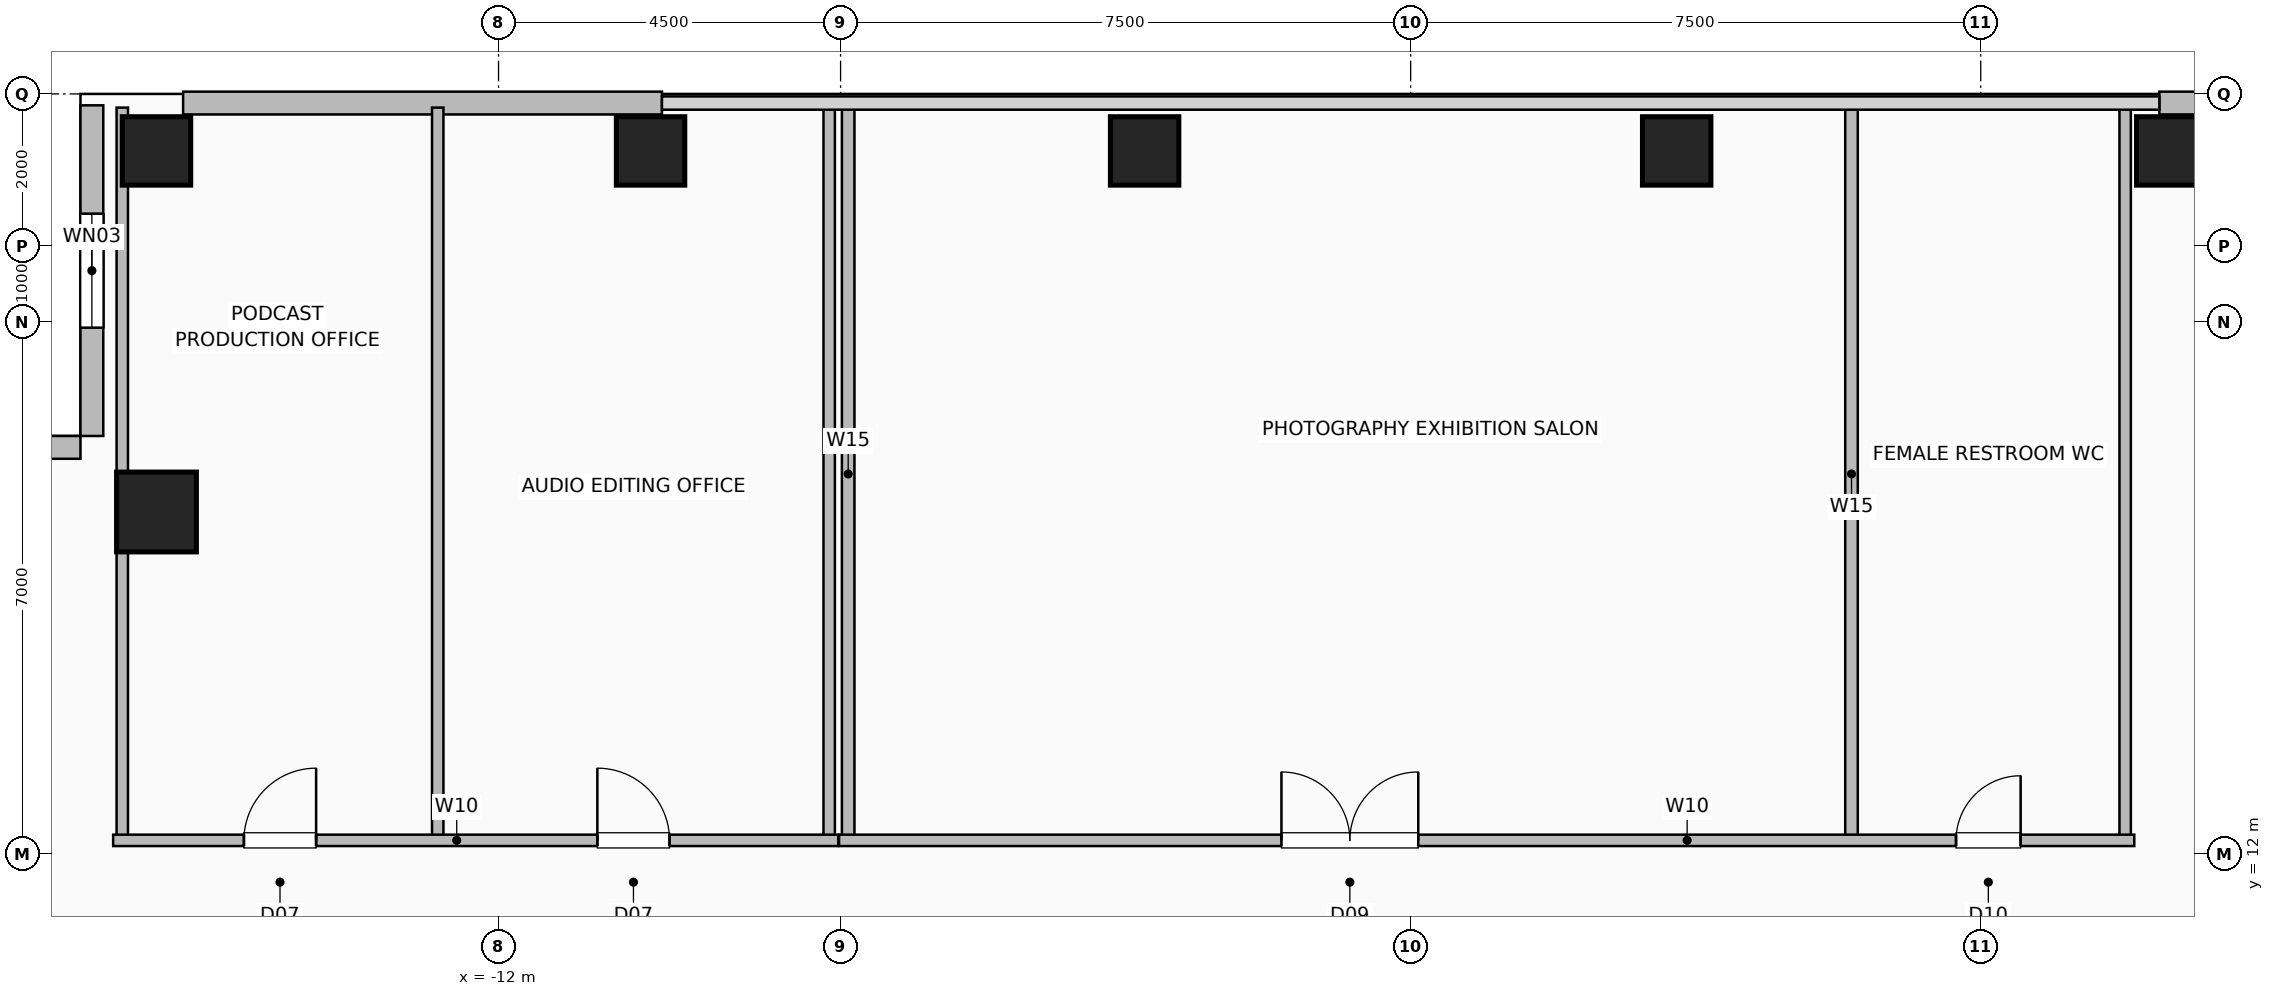
"""IFC4 building model, lengths in metres.
Left out: names, types, materials, properties, quantities, classifications, styles, units other than length and angle.
Written with IfcOpenShell. Run it as: python <this file> out.ifc"""

import sys

from ifc_helpers import new_model, si_unit, direction, frame, frame_2d, origin, origin_2d, place, context, subcontext, project, spatial, rectangle, hollow_rectangle, extrude, element, fill, save


model = new_model("IFC4")
c1 = context("Model", 3, precision=1e-05, world=origin(), true_north=direction((0.0, 1.0)))
c2 = subcontext(c1, "Body", "Model", "MODEL_VIEW")
j1 = project(units=[si_unit("LENGTHUNIT", "METRE"), si_unit("PLANEANGLEUNIT", "RADIAN")], contexts=[c1])
p1 = place(None, origin())
s1 = spatial("IfcSite", under=j1, at=p1, CompositionType="ELEMENT")
p2 = place(p1, origin())
s2 = spatial("IfcBuilding", under=s1, at=p2, CompositionType="ELEMENT")
p3 = place(p2, frame((0.0, 0.0, 144.4)))
s3 = spatial("IfcBuildingStorey", under=s2, at=p3, CompositionType="ELEMENT", Elevation=144.4)
for number, where, z_axis, x_axis in (
    (1, (-16.5, 21.25, 0.0), (0.0, 0.0, 1.0), (1.0, 0.0, 0.0)),
    (2, (-10.0, 21.25, 0.0), (0.0, 0.0, 1.0), (1.0, 0.0, 0.0)),
    (3, (-3.5, 21.25, 0.0), (0.0, 0.0, 1.0), (1.0, 0.0, 0.0)),
    (4, (3.5, 21.25, 0.0), (0.0, 0.0, 1.0), (1.0, 0.0, 0.0)),
    (5, (10.0, 21.25, 0.0), (0.0, 0.0, 1.0), (1.0, 0.0, 0.0)),
):
    element("IfcColumn", number, at=place(p3, frame(where, z_axis=z_axis, x_axis=x_axis)), inside=s3, PredefinedType="COLUMN", context=c2, shape_type="SweptSolid", body=[
        extrude(hollow_rectangle(XDim=0.9, YDim=0.9, WallThickness=0.045, at=origin_2d()), origin(), (0.0, 0.0, 1.0), 3.6),
    ])
p4 = place(p3, frame((-16.5, 16.5, 0.0), z_axis=(0.0, 0.0, 1.0), x_axis=(1.0, 0.0, 0.0)))
e6 = element("IfcColumn", 6, at=p4, inside=s3, PredefinedType="COLUMN", context=c2, shape_type="SweptSolid", body=[
    extrude(hollow_rectangle(XDim=1.05, YDim=1.05, WallThickness=0.05, at=origin_2d()), origin(), (0.0, 0.0, 1.0), 3.6),
])
for number, where, z_axis, x_axis in (
    (7, (-16.15, 21.88, 0.0), (0.0, 0.0, 1.0), (1.0, 0.0, 0.0)),
    (8, (9.85, 21.88, 0.0), (0.0, 0.0, 1.0), (1.0, 0.0, 0.0)),
):
    element("IfcWall", number, at=place(p3, frame(where, z_axis=z_axis, x_axis=x_axis)), inside=s3, PredefinedType="SOLIDWALL", context=c2, shape_type="SweptSolid", body=[
        extrude(rectangle(XDim=6.3, YDim=0.3, at=frame_2d((3.15, 0.0))), origin(), (0.0, 0.0, 1.0), 3.36),
    ])
p5 = place(p3, frame((-17.35, 21.85, 0.0), z_axis=(0.0, 0.0, 1.0), x_axis=(0.0, -1.0, 0.0)))
e9 = element("IfcWall", 9, at=p5, inside=s3, PredefinedType="SOLIDWALL", context=c2, shape_type="SweptSolid", body=[
    extrude(rectangle(XDim=4.35, YDim=0.3, at=frame_2d((2.175, 0.0))), origin(), (0.0, 0.0, 1.0), 3.36),
])
p6 = place(p5, frame((1.425, 0.0, 0.9)))
e10 = element("IfcOpeningElement", 10, at=p6, cuts=e9, PredefinedType="OPENING", context=c2, shape_type="SweptSolid", body=[
    extrude(rectangle(XDim=1.5, YDim=1.8, at=frame_2d((0.75, 0.9))), frame((0.0, 0.16, 0.0), z_axis=(0.0, -1.0, 0.0), x_axis=(1.0, 0.0, 0.0)), (0.0, 0.0, 1.0), 0.32),
])
p7 = place(p3, frame((-21.85, 17.35, 0.0), z_axis=(0.0, 0.0, 1.0), x_axis=(1.0, 0.0, 0.0)))
e11 = element("IfcWall", 11, at=p7, inside=s3, PredefinedType="SOLIDWALL", context=c2, shape_type="SweptSolid", body=[
    extrude(rectangle(XDim=4.35, YDim=0.3, at=frame_2d((2.175, 0.0))), origin(), (0.0, 0.0, 1.0), 3.36),
])
for number, where, z_axis, x_axis in (
    (12, (-16.95, 12.18, 0.0), (0.0, 0.0, 1.0), (0.0, 1.0, 0.0)),
    (13, (-12.8, 12.18, 0.0), (0.0, 0.0, 1.0), (0.0, 1.0, 0.0)),
    (14, (-7.65, 12.18, 0.0), (0.0, 0.0, 1.0), (0.0, 1.0, 0.0)),
):
    element("IfcWall", number, at=place(p3, frame(where, z_axis=z_axis, x_axis=x_axis)), inside=s3, PredefinedType="PARTITIONING", context=c2, shape_type="SweptSolid", body=[
        extrude(rectangle(XDim=9.64, YDim=0.15, at=frame_2d((4.82, 0.0))), origin(), (0.0, 0.0, 1.0), 3.36),
    ])
p8 = place(p3, frame((-17.07, 12.18, 0.0), z_axis=(0.0, 0.0, 1.0), x_axis=(1.0, 0.0, 0.0)))
e15 = element("IfcWall", 15, at=p8, inside=s3, PredefinedType="PARTITIONING", context=c2, shape_type="SweptSolid", body=[
    extrude(rectangle(XDim=9.54, YDim=0.15, at=frame_2d((4.77, 0.0))), origin(), (0.0, 0.0, 1.0), 3.36),
])
p9 = place(p8, frame((1.72, 0.0, 0.0)))
e16 = element("IfcOpeningElement", 16, at=p9, cuts=e15, PredefinedType="OPENING", context=c2, shape_type="SweptSolid", body=[
    extrude(rectangle(XDim=0.95, YDim=2.06, at=frame_2d((0.475, 1.03))), frame((0.0, 0.085, 0.0), z_axis=(0.0, -1.0, 0.0), x_axis=(1.0, 0.0, 0.0)), (0.0, 0.0, 1.0), 0.17),
])
p10 = place(p8, frame((6.37, 0.0, 0.0)))
e17 = element("IfcOpeningElement", 17, at=p10, cuts=e15, PredefinedType="OPENING", context=c2, shape_type="SweptSolid", body=[
    extrude(rectangle(XDim=0.95, YDim=2.06, at=frame_2d((0.475, 1.03))), frame((0.0, 0.085, 0.0), z_axis=(0.0, -1.0, 0.0), x_axis=(1.0, 0.0, 0.0)), (0.0, 0.0, 1.0), 0.17),
])
for number, where, z_axis, x_axis in (
    (18, (-7.4, 12.18, 0.0), (0.0, 0.0, 1.0), (0.0, 1.0, 0.0)),
    (19, (5.8, 12.18, 0.0), (0.0, 0.0, 1.0), (0.0, 1.0, 0.0)),
):
    element("IfcWall", number, at=place(p3, frame(where, z_axis=z_axis, x_axis=x_axis)), inside=s3, PredefinedType="PLUMBINGWALL", context=c2, shape_type="SweptSolid", body=[
        extrude(rectangle(XDim=9.64, YDim=0.165, at=frame_2d((4.82, 0.0))), origin(), (0.0, 0.0, 1.0), 3.36),
    ])
p11 = place(p3, frame((9.4, 12.18, 0.0), z_axis=(0.0, 0.0, 1.0), x_axis=(0.0, 1.0, 0.0)))
e20 = element("IfcWall", 20, at=p11, inside=s3, PredefinedType="PARTITIONING", context=c2, shape_type="SweptSolid", body=[
    extrude(rectangle(XDim=9.64, YDim=0.15, at=frame_2d((4.82, 0.0))), origin(), (0.0, 0.0, 1.0), 3.36),
])
p12 = place(p3, frame((-7.52, 12.18, 0.0), z_axis=(0.0, 0.0, 1.0), x_axis=(1.0, 0.0, 0.0)))
e21 = element("IfcWall", 21, at=p12, inside=s3, PredefinedType="PARTITIONING", context=c2, shape_type="SweptSolid", body=[
    extrude(rectangle(XDim=17.04, YDim=0.15, at=frame_2d((8.52, 0.0))), origin(), (0.0, 0.0, 1.0), 3.36),
])
p13 = place(p12, frame((5.82, 0.0, 0.0)))
e22 = element("IfcOpeningElement", 22, at=p13, cuts=e21, PredefinedType="OPENING", context=c2, shape_type="SweptSolid", body=[
    extrude(rectangle(XDim=1.8, YDim=2.08, at=frame_2d((0.9, 1.04))), frame((0.0, 0.085, 0.0), z_axis=(0.0, -1.0, 0.0), x_axis=(1.0, 0.0, 0.0)), (0.0, 0.0, 1.0), 0.17),
])
p14 = place(p12, frame((14.695, 0.0, 0.0)))
e23 = element("IfcOpeningElement", 23, at=p14, cuts=e21, PredefinedType="OPENING", context=c2, shape_type="SweptSolid", body=[
    extrude(rectangle(XDim=0.85, YDim=2.05, at=frame_2d((0.425, 1.025))), frame((0.0, 0.085, 0.0), z_axis=(0.0, -1.0, 0.0), x_axis=(1.0, 0.0, 0.0)), (0.0, 0.0, 1.0), 0.17),
])
p15 = place(p6, origin())
e24 = element("IfcWindow", 24, at=p15, inside=s3, PartitioningType="SINGLE_PANEL", PredefinedType="WINDOW", context=c2, shape_type="SweptSolid", body=[
    extrude(rectangle(XDim=1.5, YDim=1.8, at=frame_2d((0.75, 0.9))), frame((0.0, 0.03, 0.0), z_axis=(0.0, -1.0, 0.0), x_axis=(1.0, 0.0, 0.0)), (0.0, 0.0, 1.0), 0.06),
])
fill(e10, e24)
p16 = place(p9, origin())
e25 = element("IfcDoor", 25, at=p16, inside=s3, OperationType="SINGLE_SWING_RIGHT", PredefinedType="DOOR", context=c2, shape_type="SweptSolid", body=[
    extrude(rectangle(XDim=0.95, YDim=2.06, at=frame_2d((0.475, 1.03))), frame((0.0, 0.025, 0.0), z_axis=(0.0, -1.0, 0.0), x_axis=(1.0, 0.0, 0.0)), (0.0, 0.0, 1.0), 0.05),
])
fill(e16, e25)
p17 = place(p10, origin())
e26 = element("IfcDoor", 26, at=p17, inside=s3, OperationType="SINGLE_SWING_LEFT", PredefinedType="DOOR", context=c2, shape_type="SweptSolid", body=[
    extrude(rectangle(XDim=0.95, YDim=2.06, at=frame_2d((0.475, 1.03))), frame((0.0, 0.025, 0.0), z_axis=(0.0, -1.0, 0.0), x_axis=(1.0, 0.0, 0.0)), (0.0, 0.0, 1.0), 0.05),
])
fill(e17, e26)
p18 = place(p13, origin())
e27 = element("IfcDoor", 27, at=p18, inside=s3, OperationType="DOUBLE_DOOR_SINGLE_SWING", PredefinedType="DOOR", context=c2, shape_type="SweptSolid", body=[
    extrude(rectangle(XDim=1.8, YDim=2.08, at=frame_2d((0.9, 1.04))), frame((0.0, 0.025, 0.0), z_axis=(0.0, -1.0, 0.0), x_axis=(1.0, 0.0, 0.0)), (0.0, 0.0, 1.0), 0.05),
])
fill(e22, e27)
p19 = place(p14, origin())
e28 = element("IfcDoor", 28, at=p19, inside=s3, OperationType="SINGLE_SWING_RIGHT", PredefinedType="DOOR", context=c2, shape_type="SweptSolid", body=[
    extrude(rectangle(XDim=0.85, YDim=2.05, at=frame_2d((0.425, 1.025))), frame((0.0, 0.025, 0.0), z_axis=(0.0, -1.0, 0.0), x_axis=(1.0, 0.0, 0.0)), (0.0, 0.0, 1.0), 0.05),
])
fill(e23, e28)
save(model, sys.argv[1])
